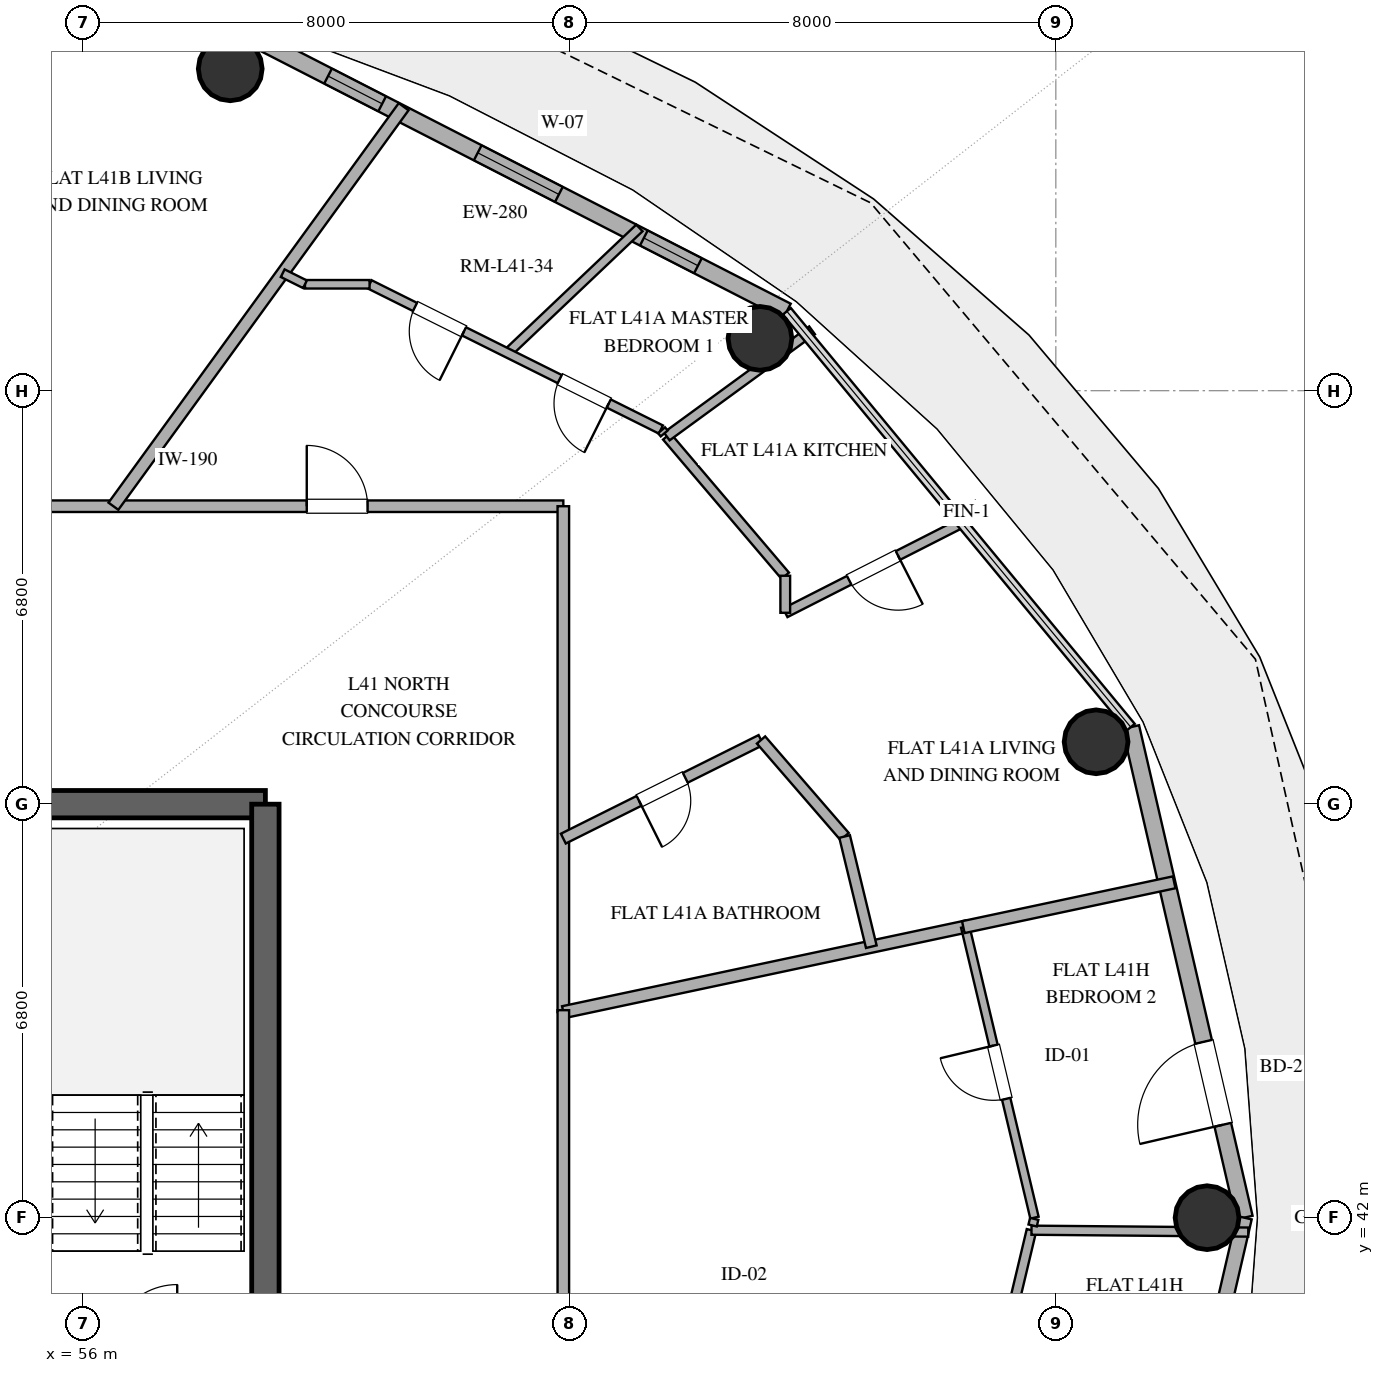
"""IFC4 building model, lengths in metres.
Left out: names, types, materials, properties, quantities, classifications, styles, units other than length and angle.
Written with IfcOpenShell. Run it as: python <this file> out.ifc"""

import sys

from ifc_helpers import new_model, si_unit, direction, frame, frame_2d, origin, origin_2d, place, context, subcontext, project, spatial, rectangle, hollow_circle, extrude, element, fill, save


model = new_model("IFC4")
c1 = context("Model", 3, precision=1e-05, world=origin(), true_north=direction((0.0, 1.0)))
c2 = subcontext(c1, "Body", "Model", "MODEL_VIEW")
j1 = project(units=[si_unit("LENGTHUNIT", "METRE"), si_unit("PLANEANGLEUNIT", "RADIAN")], contexts=[c1])
p1 = place(None, origin())
s1 = spatial("IfcSite", under=j1, at=p1, CompositionType="ELEMENT")
p2 = place(p1, origin())
s2 = spatial("IfcBuilding", under=s1, at=p2, CompositionType="ELEMENT")
p3 = place(p2, frame((0.0, 0.0, 165.0)))
s3 = spatial("IfcBuildingStorey", under=s2, at=p3, CompositionType="ELEMENT", Elevation=165.0)
p4 = place(p3, frame((55.0, 48.8, 0.0), z_axis=(0.0, 0.0, 1.0), x_axis=(1.0, 0.0, 0.0)))
e1 = element("IfcWall", 1, at=p4, inside=s3, PredefinedType="SHEAR", context=c2, shape_type="SweptSolid", body=[
    extrude(rectangle(XDim=4.0, YDim=0.45, at=frame_2d((2.0, 0.0))), origin(), (0.0, 0.0, 1.0), 3.38),
])
p5 = place(p3, frame((59.0, 35.2, 0.0), z_axis=(0.0, 0.0, 1.0), x_axis=(0.0, 1.0, 0.0)))
e2 = element("IfcWall", 2, at=p5, inside=s3, PredefinedType="SHEAR", context=c2, shape_type="SweptSolid", body=[
    extrude(rectangle(XDim=13.6, YDim=0.45, at=frame_2d((6.8, 0.0))), origin(), (0.0, 0.0, 1.0), 3.38),
])
for number, where, z_axis, x_axis in (
    (3, (74.487, 42.0, 0.0), (0.0, 0.0, 1.0), (1.0, 0.0, 0.0)),
    (4, (72.662, 49.826, 0.0), (0.0, 0.0, 1.0), (1.0, 0.0, 0.0)),
    (5, (67.134, 56.46, 0.0), (0.0, 0.0, 1.0), (1.0, 0.0, 0.0)),
    (6, (58.422, 60.893, 0.0), (0.0, 0.0, 1.0), (1.0, 0.0, 0.0)),
):
    element("IfcColumn", number, at=place(p3, frame(where, z_axis=z_axis, x_axis=x_axis)), inside=s3, PredefinedType="COLUMN", context=c2, shape_type="SweptSolid", body=[
        extrude(hollow_circle(Radius=0.525, WallThickness=0.028, at=origin_2d()), origin(), (0.0, 0.0, 1.0), 3.38),
    ])
p6 = place(p3, frame((75.099, 42.0, 0.0), z_axis=(0.0, 0.0, 1.0), x_axis=(-0.225473184558, 0.974249374157, 0.0)))
e7 = element("IfcWall", 7, at=p6, inside=s3, PredefinedType="SOLIDWALL", context=c2, shape_type="SweptSolid", body=[
    extrude(rectangle(XDim=8.28, YDim=0.28, at=frame_2d((4.14, 0.0))), origin(), (0.0, 0.0, 1.0), 3.38),
])
p7 = place(p6, frame((1.568, 0.0, 0.0)))
e8 = element("IfcOpeningElement", 8, at=p7, cuts=e7, PredefinedType="OPENING", context=c2, shape_type="SweptSolid", body=[
    extrude(rectangle(XDim=1.4, YDim=2.2, at=frame_2d((0.7, 1.1))), frame((0.0, 0.15, 0.0), z_axis=(0.0, -1.0, 0.0), x_axis=(1.0, 0.0, 0.0)), (0.0, 0.0, 1.0), 0.3),
])
p8 = place(p3, frame((67.576, 56.906, 0.0), z_axis=(0.0, 0.0, 1.0), x_axis=(-0.889872523182, 0.456209263919, 0.0)))
e9 = element("IfcWall", 9, at=p8, inside=s3, PredefinedType="SOLIDWALL", context=c2, shape_type="SweptSolid", body=[
    extrude(rectangle(XDim=10.016, YDim=0.28, at=frame_2d((5.008, 0.0))), origin(), (0.0, 0.0, 1.0), 3.38),
])
p9 = place(p8, frame((4.213, 0.0, 0.85)))
e10 = element("IfcOpeningElement", 10, at=p9, cuts=e9, PredefinedType="OPENING", context=c2, shape_type="SweptSolid", body=[
    extrude(rectangle(XDim=1.5, YDim=1.8, at=frame_2d((0.75, 0.9))), frame((0.0, 0.15, 0.0), z_axis=(0.0, -1.0, 0.0), x_axis=(1.0, 0.0, 0.0)), (0.0, 0.0, 1.0), 0.3),
])
p10 = place(p8, frame((7.479, 0.0, 0.85)))
e11 = element("IfcOpeningElement", 11, at=p10, cuts=e9, PredefinedType="OPENING", context=c2, shape_type="SweptSolid", body=[
    extrude(rectangle(XDim=1.0, YDim=1.8, at=frame_2d((0.5, 0.9))), frame((0.0, 0.15, 0.0), z_axis=(0.0, -1.0, 0.0), x_axis=(1.0, 0.0, 0.0)), (0.0, 0.0, 1.0), 0.3),
])
p11 = place(p8, frame((1.643, 0.0, 0.85)))
e12 = element("IfcOpeningElement", 12, at=p11, cuts=e9, PredefinedType="OPENING", context=c2, shape_type="SweptSolid", body=[
    extrude(rectangle(XDim=1.0, YDim=1.8, at=frame_2d((0.5, 0.9))), frame((0.0, 0.15, 0.0), z_axis=(0.0, -1.0, 0.0), x_axis=(1.0, 0.0, 0.0)), (0.0, 0.0, 1.0), 0.3),
])
p12 = place(p3, frame((73.232, 33.933, 0.0), z_axis=(0.0, 0.0, 1.0), x_axis=(0.225473184558, 0.974249374157, 0.0)))
e13 = element("IfcWall", 13, at=p12, inside=s3, PredefinedType="SOLIDWALL", context=c2, shape_type="SweptSolid", body=[
    extrude(rectangle(XDim=8.28, YDim=0.25, at=frame_2d((4.14, 0.0))), origin(), (0.0, 0.0, 1.0), 3.38),
])
p13 = place(p12, frame((5.495, 0.0, 1.42)))
e14 = element("IfcOpeningElement", 14, at=p13, cuts=e13, PredefinedType="OPENING", context=c2, shape_type="SweptSolid", body=[
    extrude(rectangle(XDim=1.0, YDim=1.05, at=frame_2d((0.5, 0.525))), frame((0.0, 0.135, 0.0), z_axis=(0.0, -1.0, 0.0), x_axis=(1.0, 0.0, 0.0)), (0.0, 0.0, 1.0), 0.27),
])
p14 = place(p3, frame((51.543, 53.7, 0.0), z_axis=(0.0, 0.0, 1.0), x_axis=(1.0, 0.0, 0.0)))
e15 = element("IfcWall", 15, at=p14, inside=s3, PredefinedType="PARTITIONING", context=c2, shape_type="SweptSolid", body=[
    extrude(rectangle(XDim=12.356, YDim=0.19, at=frame_2d((6.178, 0.0))), origin(), (0.0, 0.0, 1.0), 2.74),
])
p15 = place(p14, frame((8.137, 0.0, 0.0)))
e16 = element("IfcOpeningElement", 16, at=p15, cuts=e15, PredefinedType="OPENING", context=c2, shape_type="SweptSolid", body=[
    extrude(rectangle(XDim=1.0, YDim=2.2, at=frame_2d((0.5, 1.1))), frame((0.0, 0.105, 0.0), z_axis=(0.0, -1.0, 0.0), x_axis=(1.0, 0.0, 0.0)), (0.0, 0.0, 1.0), 0.21),
])
p16 = place(p14, frame((1.998, 0.0, 0.0)))
e17 = element("IfcOpeningElement", 17, at=p16, cuts=e15, PredefinedType="OPENING", context=c2, shape_type="SweptSolid", body=[
    extrude(rectangle(XDim=1.0, YDim=2.2, at=frame_2d((0.5, 1.1))), frame((0.0, 0.105, 0.0), z_axis=(0.0, -1.0, 0.0), x_axis=(1.0, 0.0, 0.0)), (0.0, 0.0, 1.0), 0.21),
])
p17 = place(p3, frame((63.9, 53.7, 0.0), z_axis=(0.0, 0.0, 1.0), x_axis=(0.0, -1.0, 0.0)))
e18 = element("IfcWall", 18, at=p17, inside=s3, PredefinedType="PARTITIONING", context=c2, shape_type="SweptSolid", body=[
    extrude(rectangle(XDim=8.32, YDim=0.19, at=frame_2d((4.16, 0.0))), origin(), (0.0, 0.0, 1.0), 2.74),
])
p18 = place(p3, frame((63.9, 45.38, 0.0), z_axis=(0.0, 0.0, 1.0), x_axis=(0.978145779981, 0.207920256603, 0.0)))
e19 = element("IfcWall", 19, at=p18, inside=s3, PredefinedType="PARTITIONING", context=c2, shape_type="SweptSolid", body=[
    extrude(rectangle(XDim=6.789, YDim=0.2, at=frame_2d((3.395, 0.0))), origin(), (0.0, 0.0, 1.0), 2.74),
])
p19 = place(p3, frame((63.9, 45.412, 0.0), z_axis=(0.0, 0.0, 1.0), x_axis=(0.0, -1.0, 0.0)))
e20 = element("IfcWall", 20, at=p19, inside=s3, PredefinedType="PARTITIONING", context=c2, shape_type="SweptSolid", body=[
    extrude(rectangle(XDim=4.987, YDim=0.19, at=frame_2d((2.494, 0.0))), origin(), (0.0, 0.0, 1.0), 2.74),
])
p20 = place(p3, frame((71.649, 42.0, 0.0), z_axis=(0.0, 0.0, 1.0), x_axis=(-0.231622764326, 0.972805682059, 0.0)))
e21 = element("IfcWall", 21, at=p20, inside=s3, PredefinedType="PARTITIONING", context=c2, shape_type="SweptSolid", body=[
    extrude(rectangle(XDim=4.918, YDim=0.14, at=frame_2d((2.459, 0.0))), origin(), (0.0, 0.0, 1.0), 2.74),
])
p21 = place(p20, frame((2.009, 0.0, 0.0)))
e22 = element("IfcOpeningElement", 22, at=p21, cuts=e21, PredefinedType="OPENING", context=c2, shape_type="SweptSolid", body=[
    extrude(rectangle(XDim=0.9, YDim=2.1, at=frame_2d((0.45, 1.05))), frame((0.0, 0.08, 0.0), z_axis=(0.0, -1.0, 0.0), x_axis=(1.0, 0.0, 0.0)), (0.0, 0.0, 1.0), 0.16),
])
p22 = place(p3, frame((61.274, 60.27, 0.0), z_axis=(0.0, 0.0, 1.0), x_axis=(-0.587785528328, -0.809016793823, 0.0)))
e23 = element("IfcWall", 23, at=p22, inside=s3, PredefinedType="PARTITIONING", context=c2, shape_type="SweptSolid", body=[
    extrude(rectangle(XDim=8.121, YDim=0.2, at=frame_2d((4.061, 0.0))), origin(), (0.0, 0.0, 1.0), 2.74),
])
p23 = place(p3, frame((67.152, 49.856, 0.0), z_axis=(0.0, 0.0, 1.0), x_axis=(-0.894843352961, -0.446380301605, 0.0)))
e24 = element("IfcWall", 24, at=p23, inside=s3, PredefinedType="PLUMBINGWALL", context=c2, shape_type="SweptSolid", body=[
    extrude(rectangle(XDim=3.634, YDim=0.18, at=frame_2d((1.817, 0.0))), origin(), (0.0, 0.0, 1.0), 2.74),
])
p24 = place(p23, frame((1.392, 0.0, 0.0)))
e25 = element("IfcOpeningElement", 25, at=p24, cuts=e24, PredefinedType="OPENING", context=c2, shape_type="SweptSolid", body=[
    extrude(rectangle(XDim=0.85, YDim=2.1, at=frame_2d((0.425, 1.05))), frame((0.0, 0.1, 0.0), z_axis=(0.0, -1.0, 0.0), x_axis=(1.0, 0.0, 0.0)), (0.0, 0.0, 1.0), 0.2),
])
p25 = place(p3, frame((70.019, 35.158, 0.0), z_axis=(0.0, 0.0, 1.0), x_axis=(0.231657621012, 0.972797382103, 0.0)))
e26 = element("IfcWall", 26, at=p25, inside=s3, PredefinedType="PLUMBINGWALL", context=c2, shape_type="SweptSolid", body=[
    extrude(rectangle(XDim=6.822, YDim=0.16, at=frame_2d((3.411, 0.0))), origin(), (0.0, 0.0, 1.0), 2.74),
])
p26 = place(p25, frame((4.567, 0.0, 0.0)))
e27 = element("IfcOpeningElement", 27, at=p26, cuts=e26, PredefinedType="OPENING", context=c2, shape_type="SweptSolid", body=[
    extrude(rectangle(XDim=0.9, YDim=2.1, at=frame_2d((0.45, 1.05))), frame((0.0, 0.09, 0.0), z_axis=(0.0, -1.0, 0.0), x_axis=(1.0, 0.0, 0.0)), (0.0, 0.0, 1.0), 0.18),
])
p27 = place(p3, frame((75.165, 41.763, 0.0), z_axis=(0.0, 0.0, 1.0), x_axis=(-0.999962184605, 0.00869651424, 0.0)))
e28 = element("IfcWall", 28, at=p27, inside=s3, PredefinedType="PARTITIONING", context=c2, shape_type="SweptSolid", body=[
    extrude(rectangle(XDim=3.565, YDim=0.15, at=frame_2d((1.783, 0.0))), origin(), (0.0, 0.0, 1.0), 2.74),
])
p28 = place(p3, frame((73.946, 47.515, 0.0), z_axis=(0.0, 0.0, 1.0), x_axis=(-0.978135742848, -0.207967469966, 0.0)))
e29 = element("IfcWall", 29, at=p28, inside=s3, PredefinedType="PARTITIONING", context=c2, shape_type="SweptSolid", body=[
    extrude(rectangle(XDim=3.545, YDim=0.2, at=frame_2d((1.773, 0.0))), origin(), (0.0, 0.0, 1.0), 2.74),
])
p29 = place(p3, frame((70.562, 53.48, 0.0), z_axis=(0.0, 0.0, 1.0), x_axis=(-0.891269321093, -0.453474362317, 0.0)))
e30 = element("IfcWall", 30, at=p29, inside=s3, PredefinedType="PLUMBINGWALL", context=c2, shape_type="SweptSolid", body=[
    extrude(rectangle(XDim=3.379, YDim=0.16, at=frame_2d((1.689, 0.0))), origin(), (0.0, 0.0, 1.0), 2.74),
])
p30 = place(p29, frame((1.3, 0.0, 0.0)))
e31 = element("IfcOpeningElement", 31, at=p30, cuts=e30, PredefinedType="OPENING", context=c2, shape_type="SweptSolid", body=[
    extrude(rectangle(XDim=0.9, YDim=2.1, at=frame_2d((0.45, 1.05))), frame((0.0, 0.09, 0.0), z_axis=(0.0, -1.0, 0.0), x_axis=(1.0, 0.0, 0.0)), (0.0, 0.0, 1.0), 0.18),
])
p31 = place(p3, frame((67.55, 52.557, 0.0), z_axis=(0.0, 0.0, 1.0), x_axis=(-0.64791931309, 0.761708975742, 0.0)))
e32 = element("IfcWall", 32, at=p31, inside=s3, PredefinedType="PLUMBINGWALL", context=c2, shape_type="SweptSolid", body=[
    extrude(rectangle(XDim=3.008, YDim=0.16, at=frame_2d((1.504, 0.0))), origin(), (0.0, 0.0, 1.0), 2.74),
])
p32 = place(p3, frame((62.983, 56.219, 0.0), z_axis=(0.0, 0.0, 1.0), x_axis=(0.725364351486, 0.688365133918, 0.0)))
e33 = element("IfcWall", 33, at=p32, inside=s3, PredefinedType="PARTITIONING", context=c2, shape_type="SweptSolid", body=[
    extrude(rectangle(XDim=2.989, YDim=0.15, at=frame_2d((1.495, 0.0))), origin(), (0.0, 0.0, 1.0), 2.74),
])
p33 = place(p3, frame((65.601, 54.848, 0.0), z_axis=(0.0, 0.0, 1.0), x_axis=(0.807696422095, 0.589598583559, 0.0)))
e34 = element("IfcWall", 34, at=p33, inside=s3, PredefinedType="PLUMBINGWALL", context=c2, shape_type="SweptSolid", body=[
    extrude(rectangle(XDim=2.958, YDim=0.16, at=frame_2d((1.479, 0.0))), origin(), (0.0, 0.0, 1.0), 2.74),
])
p34 = place(p3, frame((65.505, 54.961, 0.0), z_axis=(0.0, 0.0, 1.0), x_axis=(-0.894955531207, 0.446155350929, 0.0)))
e35 = element("IfcWall", 35, at=p34, inside=s3, PredefinedType="PARTITIONING", context=c2, shape_type="SweptSolid", body=[
    extrude(rectangle(XDim=5.354, YDim=0.15, at=frame_2d((2.677, 0.0))), origin(), (0.0, 0.0, 1.0), 2.74),
])
p35 = place(p34, frame((0.959, 0.0, 0.0)))
e36 = element("IfcOpeningElement", 36, at=p35, cuts=e35, PredefinedType="OPENING", context=c2, shape_type="SweptSolid", body=[
    extrude(rectangle(XDim=0.9, YDim=2.1, at=frame_2d((0.45, 1.05))), frame((0.0, 0.085, 0.0), z_axis=(0.0, -1.0, 0.0), x_axis=(1.0, 0.0, 0.0)), (0.0, 0.0, 1.0), 0.17),
])
p36 = place(p34, frame((3.619, 0.0, 0.0)))
e37 = element("IfcOpeningElement", 37, at=p36, cuts=e35, PredefinedType="OPENING", context=c2, shape_type="SweptSolid", body=[
    extrude(rectangle(XDim=0.9, YDim=2.1, at=frame_2d((0.45, 1.05))), frame((0.0, 0.085, 0.0), z_axis=(0.0, -1.0, 0.0), x_axis=(1.0, 0.0, 0.0)), (0.0, 0.0, 1.0), 0.17),
])
p37 = place(p3, frame((68.526, 48.268, 0.0), z_axis=(0.0, 0.0, 1.0), x_axis=(-0.654594060889, 0.755980565524, 0.0)))
e38 = element("IfcWall", 38, at=p37, inside=s3, PredefinedType="PLUMBINGWALL", context=c2, shape_type="SweptSolid", body=[
    extrude(rectangle(XDim=2.1, YDim=0.18, at=frame_2d((1.05, 0.0))), origin(), (0.0, 0.0, 1.0), 2.74),
])
p38 = place(p3, frame((68.965, 46.456, 0.0), z_axis=(0.0, 0.0, 1.0), x_axis=(-0.235442613623, 0.971888252676, 0.0)))
e39 = element("IfcWall", 39, at=p38, inside=s3, PredefinedType="PLUMBINGWALL", context=c2, shape_type="SweptSolid", body=[
    extrude(rectangle(XDim=1.865, YDim=0.18, at=frame_2d((0.932, 0.0))), origin(), (0.0, 0.0, 1.0), 2.74),
])
p39 = place(p3, frame((59.651, 57.35, 0.0), z_axis=(0.0, 0.0, 1.0), x_axis=(1.0, 0.0, 0.0)))
e40 = element("IfcWall", 40, at=p39, inside=s3, PredefinedType="PARTITIONING", context=c2, shape_type="SweptSolid", body=[
    extrude(rectangle(XDim=1.062, YDim=0.14, at=frame_2d((0.531, 0.0))), origin(), (0.0, 0.0, 1.0), 2.74),
])
p40 = place(p3, frame((67.55, 51.948, 0.0), z_axis=(0.0, 0.0, 1.0), x_axis=(0.0, 1.0, 0.0)))
e41 = element("IfcWall", 41, at=p40, inside=s3, PredefinedType="PLUMBINGWALL", context=c2, shape_type="SweptSolid", body=[
    extrude(rectangle(XDim=0.609, YDim=0.16, at=frame_2d((0.305, 0.0))), origin(), (0.0, 0.0, 1.0), 2.74),
])
p41 = place(p3, frame((59.285, 57.532, 0.0), z_axis=(0.0, 0.0, 1.0), x_axis=(0.895142158028, -0.445780794698, 0.0)))
e42 = element("IfcWall", 42, at=p41, inside=s3, PredefinedType="PARTITIONING", context=c2, shape_type="SweptSolid", body=[
    extrude(rectangle(XDim=0.409, YDim=0.14, at=frame_2d((0.205, 0.0))), origin(), (0.0, 0.0, 1.0), 2.74),
])
p42 = place(p3, frame((71.618, 41.872, 0.0), z_axis=(0.0, 0.0, 1.0), x_axis=(0.233786115402, 0.972288050037, 0.0)))
e43 = element("IfcWall", 43, at=p42, inside=s3, PredefinedType="PARTITIONING", context=c2, shape_type="SweptSolid", body=[
    extrude(rectangle(XDim=0.112, YDim=0.14, at=frame_2d((0.056, 0.0))), origin(), (0.0, 0.0, 1.0), 2.74),
])
p43 = place(p3, frame((65.56, 54.897, 0.0), z_axis=(0.0, 0.0, 1.0), x_axis=(-0.6481623323, 0.761502193685, 0.0)))
e44 = element("IfcWall", 44, at=p43, inside=s3, PredefinedType="PARTITIONING", context=c2, shape_type="SweptSolid", body=[
    extrude(rectangle(XDim=0.069, YDim=0.15, at=frame_2d((0.034, 0.0))), origin(), (0.0, 0.0, 1.0), 2.74),
])
p44 = place(p7, origin())
e45 = element("IfcDoor", 45, at=p44, inside=s3, OperationType="SINGLE_SWING_LEFT", PredefinedType="DOOR", context=c2, shape_type="SweptSolid", body=[
    extrude(rectangle(XDim=1.4, YDim=2.2, at=frame_2d((0.7, 1.1))), frame((0.0, 0.025, 0.0), z_axis=(0.0, -1.0, 0.0), x_axis=(1.0, 0.0, 0.0)), (0.0, 0.0, 1.0), 0.05),
])
fill(e8, e45)
p45 = place(p9, origin())
e46 = element("IfcWindow", 46, at=p45, inside=s3, PartitioningType="SINGLE_PANEL", PredefinedType="WINDOW", context=c2, shape_type="SweptSolid", body=[
    extrude(rectangle(XDim=1.5, YDim=1.8, at=frame_2d((0.75, 0.9))), frame((0.0, 0.03, 0.0), z_axis=(0.0, -1.0, 0.0), x_axis=(1.0, 0.0, 0.0)), (0.0, 0.0, 1.0), 0.06),
])
fill(e10, e46)
p46 = place(p10, origin())
e47 = element("IfcWindow", 47, at=p46, inside=s3, PartitioningType="SINGLE_PANEL", PredefinedType="WINDOW", context=c2, shape_type="SweptSolid", body=[
    extrude(rectangle(XDim=1.0, YDim=1.8, at=frame_2d((0.5, 0.9))), frame((0.0, 0.03, 0.0), z_axis=(0.0, -1.0, 0.0), x_axis=(1.0, 0.0, 0.0)), (0.0, 0.0, 1.0), 0.06),
])
fill(e11, e47)
p47 = place(p11, origin())
e48 = element("IfcWindow", 48, at=p47, inside=s3, PartitioningType="SINGLE_PANEL", PredefinedType="WINDOW", context=c2, shape_type="SweptSolid", body=[
    extrude(rectangle(XDim=1.0, YDim=1.8, at=frame_2d((0.5, 0.9))), frame((0.0, 0.03, 0.0), z_axis=(0.0, -1.0, 0.0), x_axis=(1.0, 0.0, 0.0)), (0.0, 0.0, 1.0), 0.06),
])
fill(e12, e48)
p48 = place(p15, origin())
e49 = element("IfcDoor", 49, at=p48, inside=s3, OperationType="SINGLE_SWING_LEFT", PredefinedType="DOOR", context=c2, shape_type="SweptSolid", body=[
    extrude(rectangle(XDim=1.0, YDim=2.2, at=frame_2d((0.5, 1.1))), frame((0.0, 0.025, 0.0), z_axis=(0.0, -1.0, 0.0), x_axis=(1.0, 0.0, 0.0)), (0.0, 0.0, 1.0), 0.05),
])
fill(e16, e49)
p49 = place(p21, origin())
e50 = element("IfcDoor", 50, at=p49, inside=s3, OperationType="SINGLE_SWING_RIGHT", PredefinedType="DOOR", context=c2, shape_type="SweptSolid", body=[
    extrude(rectangle(XDim=0.9, YDim=2.1, at=frame_2d((0.45, 1.05))), frame((0.0, 0.025, 0.0), z_axis=(0.0, -1.0, 0.0), x_axis=(1.0, 0.0, 0.0)), (0.0, 0.0, 1.0), 0.05),
])
fill(e22, e50)
p50 = place(p24, origin())
e51 = element("IfcDoor", 51, at=p50, inside=s3, OperationType="SINGLE_SWING_RIGHT", PredefinedType="DOOR", context=c2, shape_type="SweptSolid", body=[
    extrude(rectangle(XDim=0.85, YDim=2.1, at=frame_2d((0.425, 1.05))), frame((0.0, 0.025, 0.0), z_axis=(0.0, -1.0, 0.0), x_axis=(1.0, 0.0, 0.0)), (0.0, 0.0, 1.0), 0.05),
])
fill(e25, e51)
p51 = place(p30, origin())
e52 = element("IfcDoor", 52, at=p51, inside=s3, OperationType="SINGLE_SWING_LEFT", PredefinedType="DOOR", context=c2, shape_type="SweptSolid", body=[
    extrude(rectangle(XDim=0.9, YDim=2.1, at=frame_2d((0.45, 1.05))), frame((0.0, 0.025, 0.0), z_axis=(0.0, -1.0, 0.0), x_axis=(1.0, 0.0, 0.0)), (0.0, 0.0, 1.0), 0.05),
])
fill(e31, e52)
p52 = place(p35, origin())
e53 = element("IfcDoor", 53, at=p52, inside=s3, OperationType="SINGLE_SWING_LEFT", PredefinedType="DOOR", context=c2, shape_type="SweptSolid", body=[
    extrude(rectangle(XDim=0.9, YDim=2.1, at=frame_2d((0.45, 1.05))), frame((0.0, 0.025, 0.0), z_axis=(0.0, -1.0, 0.0), x_axis=(1.0, 0.0, 0.0)), (0.0, 0.0, 1.0), 0.05),
])
fill(e36, e53)
p53 = place(p36, origin())
e54 = element("IfcDoor", 54, at=p53, inside=s3, OperationType="SINGLE_SWING_LEFT", PredefinedType="DOOR", context=c2, shape_type="SweptSolid", body=[
    extrude(rectangle(XDim=0.9, YDim=2.1, at=frame_2d((0.45, 1.05))), frame((0.0, 0.025, 0.0), z_axis=(0.0, -1.0, 0.0), x_axis=(1.0, 0.0, 0.0)), (0.0, 0.0, 1.0), 0.05),
])
fill(e37, e54)
save(model, sys.argv[1])
